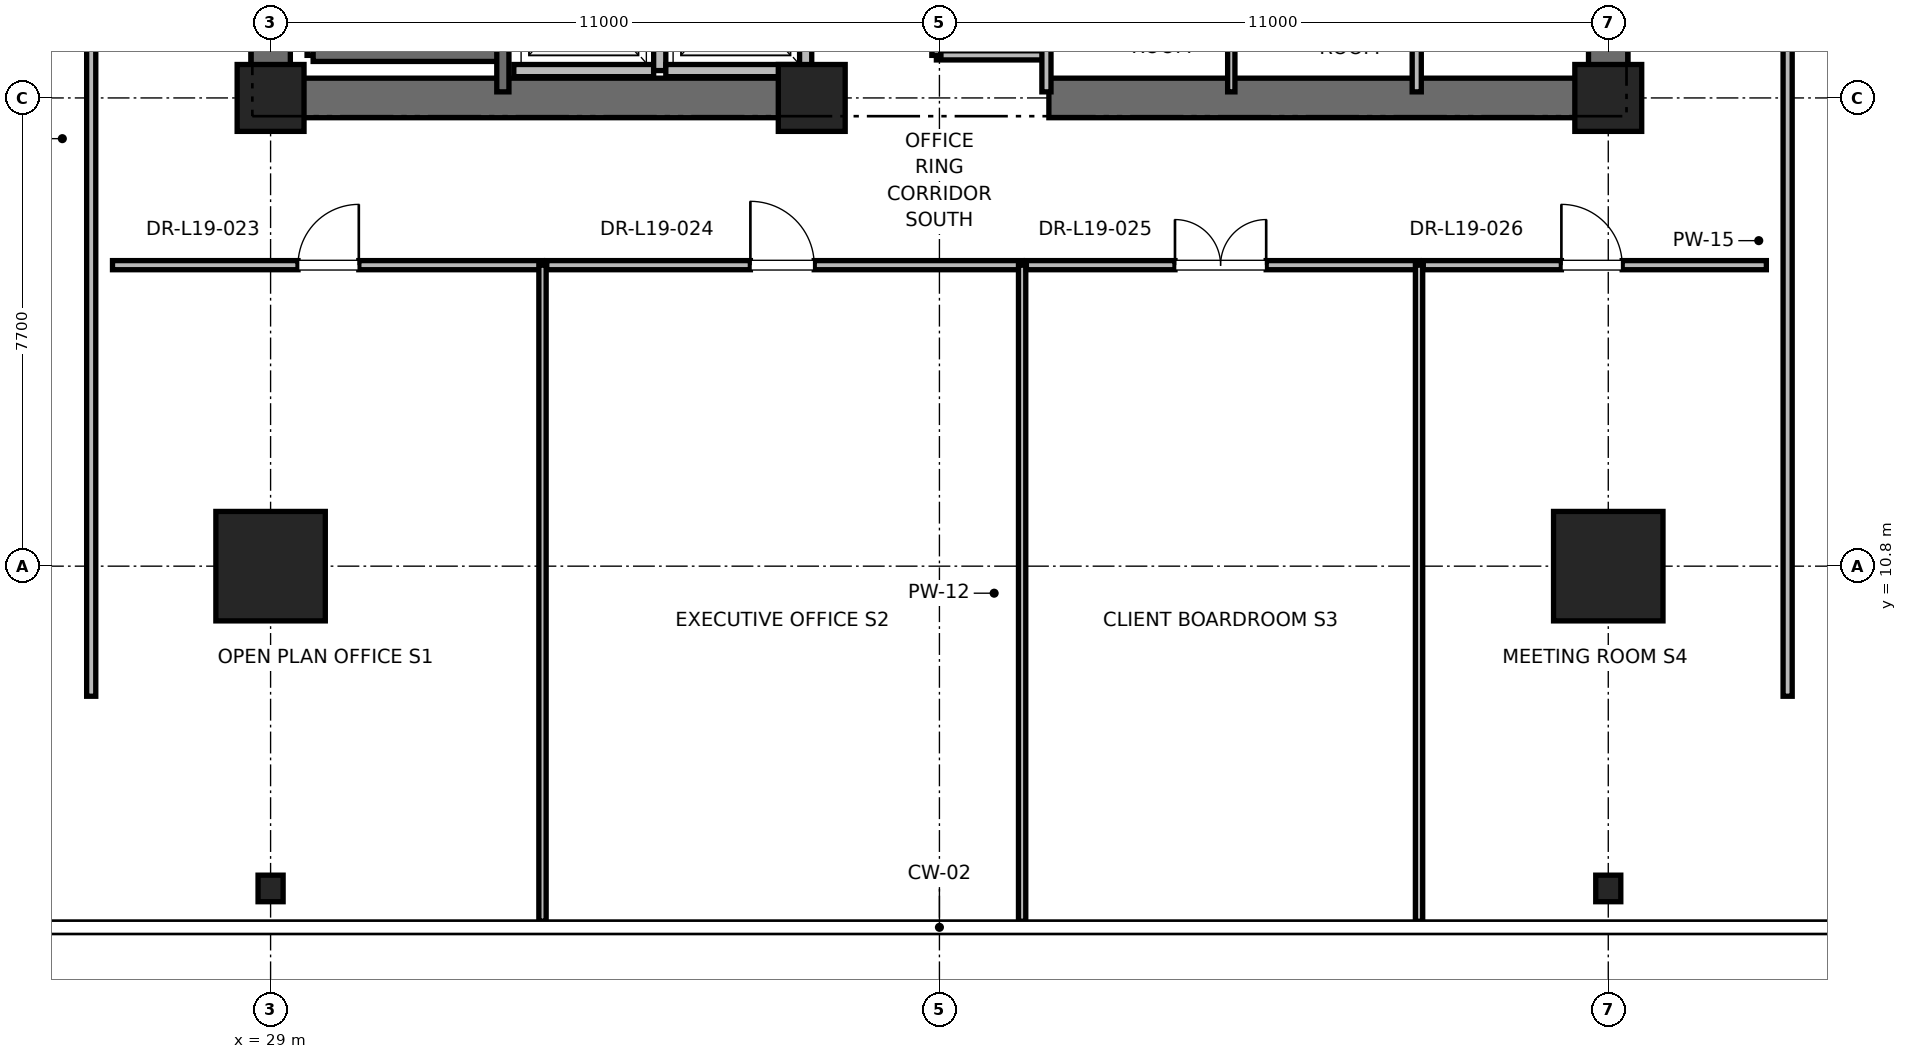
"""IFC4 building model, lengths in metres.
Left out: names, types, materials, properties, quantities, classifications, styles, units other than length and angle.
Written with IfcOpenShell. Run it as: python <this file> out.ifc"""

import sys

from ifc_helpers import new_model, si_unit, direction, frame, frame_2d, origin, origin_2d, place, context, subcontext, project, spatial, rectangle, i_section, extrude, element, fill, save


model = new_model("IFC4")
c1 = context("Model", 3, precision=1e-05, world=origin(), true_north=direction((0.0, 1.0)))
c2 = subcontext(c1, "Body", "Model", "MODEL_VIEW")
j1 = project(units=[si_unit("LENGTHUNIT", "METRE"), si_unit("PLANEANGLEUNIT", "RADIAN")], contexts=[c1])
p1 = place(None, origin())
s1 = spatial("IfcSite", under=j1, at=p1, CompositionType="ELEMENT")
p2 = place(p1, origin())
s2 = spatial("IfcBuilding", under=s1, at=p2, CompositionType="ELEMENT")
p3 = place(p2, frame((0.0, 0.0, 83.6)))
s3 = spatial("IfcBuildingStorey", under=s2, at=p3, CompositionType="ELEMENT", Elevation=83.6)
for number, where, z_axis, x_axis in (
    (1, (29.0, 10.8, 0.0), (0.0, 0.0, 1.0), (1.0, 0.0, 0.0)),
    (2, (51.0, 10.8, 0.0), (0.0, 0.0, 1.0), (1.0, 0.0, 0.0)),
):
    element("IfcColumn", number, at=place(p3, frame(where, z_axis=z_axis, x_axis=x_axis)), inside=s3, PredefinedType="COLUMN", context=c2, shape_type="SweptSolid", body=[
        extrude(rectangle(XDim=1.8, YDim=1.8, at=origin_2d()), origin(), (0.0, 0.0, 1.0), 4.0),
    ])
for number, where, z_axis, x_axis in (
    (3, (29.0, 5.5, 0.0), (0.0, 0.0, 1.0), (1.0, 0.0, 0.0)),
    (4, (51.0, 5.5, 0.0), (0.0, 0.0, 1.0), (1.0, 0.0, 0.0)),
):
    element("IfcColumn", number, at=place(p3, frame(where, z_axis=z_axis, x_axis=x_axis)), inside=s3, PredefinedType="COLUMN", context=c2, shape_type="SweptSolid", body=[
        extrude(i_section(OverallWidth=0.412, OverallDepth=0.437, WebThickness=0.036, FlangeThickness=0.058, FilletRadius=0.015, at=origin_2d()), origin(), (0.0, 0.0, 1.0), 4.0),
    ])
for number, where, z_axis, x_axis in (
    (5, (29.0, 18.5, 0.0), (0.0, 0.0, 1.0), (1.0, 0.0, 0.0)),
    (6, (51.0, 18.5, 0.0), (0.0, 0.0, 1.0), (1.0, 0.0, 0.0)),
    (7, (37.9, 18.5, 0.0), (0.0, 0.0, 1.0), (1.0, 0.0, 0.0)),
):
    element("IfcColumn", number, at=place(p3, frame(where, z_axis=z_axis, x_axis=x_axis)), inside=s3, PredefinedType="PILASTER", context=c2, shape_type="SweptSolid", body=[
        extrude(rectangle(XDim=1.1, YDim=1.1, at=origin_2d()), origin(), (0.0, 0.0, 1.0), 4.0),
    ])
for number, where, z_axis, x_axis in (
    (8, (29.0, 18.5, 0.0), (0.0, 0.0, 1.0), (1.0, 0.0, 0.0)),
    (9, (41.8, 18.5, 0.0), (0.0, 0.0, 1.0), (1.0, 0.0, 0.0)),
):
    element("IfcWall", number, at=place(p3, frame(where, z_axis=z_axis, x_axis=x_axis)), inside=s3, PredefinedType="SHEAR", context=c2, shape_type="SweptSolid", body=[
        extrude(rectangle(XDim=9.2, YDim=0.65, at=frame_2d((4.6, 0.0))), origin(), (0.0, 0.0, 1.0), 3.76),
    ])
p4 = place(p3, frame((29.0, 18.5, 0.0), z_axis=(0.0, 0.0, 1.0), x_axis=(0.0, 1.0, 0.0)))
e10 = element("IfcWall", 10, at=p4, inside=s3, PredefinedType="SHEAR", context=c2, shape_type="SweptSolid", body=[
    extrude(rectangle(XDim=8.8, YDim=0.65, at=frame_2d((4.4, 0.0))), origin(), (0.0, 0.0, 1.0), 3.76),
])
p5 = place(p3, frame((51.0, 18.5, 0.0), z_axis=(0.0, 0.0, 1.0), x_axis=(0.0, 1.0, 0.0)))
e11 = element("IfcWall", 11, at=p5, inside=s3, PredefinedType="SHEAR", context=c2, shape_type="SweptSolid", body=[
    extrude(rectangle(XDim=5.8, YDim=0.65, at=frame_2d((2.9, 0.0))), origin(), (0.0, 0.0, 1.0), 3.76),
])
p6 = place(p3, frame((29.7, 19.2, 0.0), z_axis=(0.0, 0.0, 1.0), x_axis=(0.0, 1.0, 0.0)))
e12 = element("IfcWall", 12, at=p6, inside=s3, PredefinedType="SOLIDWALL", context=c2, shape_type="SweptSolid", body=[
    extrude(rectangle(XDim=8.15, YDim=0.2, at=frame_2d((4.075, 0.0))), origin(), (0.0, 0.0, 1.0), 3.76),
])
p7 = place(p3, frame((29.7, 19.2, 0.0), z_axis=(0.0, 0.0, 1.0), x_axis=(1.0, 0.0, 0.0)))
e13 = element("IfcWall", 13, at=p7, inside=s3, PredefinedType="SOLIDWALL", context=c2, shape_type="SweptSolid", body=[
    extrude(rectangle(XDim=3.12, YDim=0.2, at=frame_2d((1.56, 0.0))), origin(), (0.0, 0.0, 1.0), 3.76),
])
p8 = place(p3, frame((32.82, 18.6, 0.0), z_axis=(0.0, 0.0, 1.0), x_axis=(0.0, 1.0, 0.0)))
e14 = element("IfcWall", 14, at=p8, inside=s3, PredefinedType="SOLIDWALL", context=c2, shape_type="SweptSolid", body=[
    extrude(rectangle(XDim=8.78, YDim=0.2, at=frame_2d((4.39, 0.0))), origin(), (0.0, 0.0, 1.0), 3.76),
])
p9 = place(p3, frame((33.0, 18.95, 0.0), z_axis=(0.0, 0.0, 1.0), x_axis=(1.0, 0.0, 0.0)))
e15 = element("IfcWall", 15, at=p9, inside=s3, PredefinedType="SOLIDWALL", context=c2, shape_type="SweptSolid", body=[
    extrude(rectangle(XDim=2.3, YDim=0.2, at=frame_2d((1.15, 0.0))), origin(), (0.0, 0.0, 1.0), 3.76),
])
p10 = place(p3, frame((35.4, 18.95, 0.0), z_axis=(0.0, 0.0, 1.0), x_axis=(0.0, 1.0, 0.0)))
e16 = element("IfcWall", 16, at=p10, inside=s3, PredefinedType="SOLIDWALL", context=c2, shape_type="SweptSolid", body=[
    extrude(rectangle(XDim=2.6, YDim=0.2, at=frame_2d((1.3, 0.0))), origin(), (0.0, 0.0, 1.0), 3.76),
])
p11 = place(p3, frame((35.5, 18.95, 0.0), z_axis=(0.0, 0.0, 1.0), x_axis=(1.0, 0.0, 0.0)))
e17 = element("IfcWall", 17, at=p11, inside=s3, PredefinedType="SOLIDWALL", context=c2, shape_type="SweptSolid", body=[
    extrude(rectangle(XDim=2.3, YDim=0.2, at=frame_2d((1.15, 0.0))), origin(), (0.0, 0.0, 1.0), 2.54),
])
p12 = place(p3, frame((37.8, 18.95, 0.0), z_axis=(0.0, 0.0, 1.0), x_axis=(0.0, 1.0, 0.0)))
e18 = element("IfcWall", 18, at=p12, inside=s3, PredefinedType="SOLIDWALL", context=c2, shape_type="SweptSolid", body=[
    extrude(rectangle(XDim=2.6, YDim=0.2, at=frame_2d((1.3, 0.0))), origin(), (0.0, 0.0, 1.0), 2.54),
])
p13 = place(p3, frame((39.95, 19.2, 0.0), z_axis=(0.0, 0.0, 1.0), x_axis=(1.0, 0.0, 0.0)))
e19 = element("IfcWall", 19, at=p13, inside=s3, PredefinedType="PARTITIONING", context=c2, shape_type="SweptSolid", body=[
    extrude(rectangle(XDim=1.81, YDim=0.15, at=frame_2d((0.905, 0.0))), origin(), (0.0, 0.0, 1.0), 2.85),
])
p14 = place(p3, frame((41.76, 18.6, 0.0), z_axis=(0.0, 0.0, 1.0), x_axis=(0.0, 1.0, 0.0)))
e20 = element("IfcWall", 20, at=p14, inside=s3, PredefinedType="PARTITIONING", context=c2, shape_type="SweptSolid", body=[
    extrude(rectangle(XDim=3.6, YDim=0.15, at=frame_2d((1.8, 0.0))), origin(), (0.0, 0.0, 1.0), 2.54),
])
p15 = place(p3, frame((39.95, 19.2, 0.0), z_axis=(0.0, 0.0, 1.0), x_axis=(0.0, 1.0, 0.0)))
e21 = element("IfcWall", 21, at=p15, inside=s3, PredefinedType="PARTITIONING", context=c2, shape_type="SweptSolid", body=[
    extrude(rectangle(XDim=3.0, YDim=0.15, at=frame_2d((1.5, 0.0))), origin(), (0.0, 0.0, 1.0), 2.85),
])
p16 = place(p15, frame((1.05, 0.0, 0.0)))
e22 = element("IfcOpeningElement", 22, at=p16, cuts=e21, PredefinedType="OPENING", context=c2, shape_type="SweptSolid", body=[
    extrude(rectangle(XDim=0.9, YDim=2.1, at=frame_2d((0.45, 1.05))), frame((0.0, 0.075, 0.0), z_axis=(0.0, -1.0, 0.0), x_axis=(1.0, 0.0, 0.0)), (0.0, 0.0, 1.0), 0.15),
])
p17 = place(p3, frame((47.85, 18.6, 0.0), z_axis=(0.0, 0.0, 1.0), x_axis=(0.0, 1.0, 0.0)))
e23 = element("IfcWall", 23, at=p17, inside=s3, PredefinedType="PARTITIONING", context=c2, shape_type="SweptSolid", body=[
    extrude(rectangle(XDim=2.54, YDim=0.15, at=frame_2d((1.27, 0.0))), origin(), (0.0, 0.0, 1.0), 2.85),
])
p18 = place(p3, frame((44.8, 18.6, 0.0), z_axis=(0.0, 0.0, 1.0), x_axis=(0.0, 1.0, 0.0)))
e24 = element("IfcWall", 24, at=p18, inside=s3, PredefinedType="PARTITIONING", context=c2, shape_type="SweptSolid", body=[
    extrude(rectangle(XDim=3.02, YDim=0.12, at=frame_2d((1.51, 0.0))), origin(), (0.0, 0.0, 1.0), 2.85),
])
p19 = place(p3, frame((26.4, 15.75, 0.0), z_axis=(0.0, 0.0, 1.0), x_axis=(1.0, 0.0, 0.0)))
e25 = element("IfcWall", 25, at=p19, inside=s3, PredefinedType="PARTITIONING", context=c2, shape_type="SweptSolid", body=[
    extrude(rectangle(XDim=7.072, YDim=0.15, at=frame_2d((3.536, 0.0))), origin(), (0.0, 0.0, 1.0), 2.85),
])
p20 = place(p19, frame((3.051, 0.0, 0.0)))
e26 = element("IfcOpeningElement", 26, at=p20, cuts=e25, PredefinedType="OPENING", context=c2, shape_type="SweptSolid", body=[
    extrude(rectangle(XDim=1.0, YDim=2.15, at=frame_2d((0.5, 1.075))), frame((0.0, 0.075, 0.0), z_axis=(0.0, -1.0, 0.0), x_axis=(1.0, 0.0, 0.0)), (0.0, 0.0, 1.0), 0.15),
])
p21 = place(p3, frame((33.472, 4.961, 0.0), z_axis=(0.0, 0.0, 1.0), x_axis=(0.0, 1.0, 0.0)))
e27 = element("IfcWall", 27, at=p21, inside=s3, PredefinedType="PARTITIONING", context=c2, shape_type="SweptSolid", body=[
    extrude(rectangle(XDim=10.789, YDim=0.12, at=frame_2d((5.395, 0.0))), origin(), (0.0, 0.0, 1.0), 2.39),
])
p22 = place(p3, frame((33.542, 15.75, 0.0), z_axis=(0.0, 0.0, 1.0), x_axis=(1.0, 0.0, 0.0)))
e28 = element("IfcWall", 28, at=p22, inside=s3, PredefinedType="PARTITIONING", context=c2, shape_type="SweptSolid", body=[
    extrude(rectangle(XDim=7.818, YDim=0.15, at=frame_2d((3.909, 0.0))), origin(), (0.0, 0.0, 1.0), 2.85),
])
p23 = place(p22, frame((3.349, 0.0, 0.0)))
e29 = element("IfcOpeningElement", 29, at=p23, cuts=e28, PredefinedType="OPENING", context=c2, shape_type="SweptSolid", body=[
    extrude(rectangle(XDim=1.05, YDim=2.2, at=frame_2d((0.525, 1.1))), frame((0.0, 0.075, 0.0), z_axis=(0.0, -1.0, 0.0), x_axis=(1.0, 0.0, 0.0)), (0.0, 0.0, 1.0), 0.15),
])
p24 = place(p3, frame((41.36, 4.961, 0.0), z_axis=(0.0, 0.0, 1.0), x_axis=(0.0, 1.0, 0.0)))
e30 = element("IfcWall", 30, at=p24, inside=s3, PredefinedType="PARTITIONING", context=c2, shape_type="SweptSolid", body=[
    extrude(rectangle(XDim=10.789, YDim=0.12, at=frame_2d((5.395, 0.0))), origin(), (0.0, 0.0, 1.0), 2.39),
])
p25 = place(p3, frame((41.43, 15.75, 0.0), z_axis=(0.0, 0.0, 1.0), x_axis=(1.0, 0.0, 0.0)))
e31 = element("IfcWall", 31, at=p25, inside=s3, PredefinedType="PARTITIONING", context=c2, shape_type="SweptSolid", body=[
    extrude(rectangle(XDim=6.458, YDim=0.15, at=frame_2d((3.229, 0.0))), origin(), (0.0, 0.0, 1.0), 2.85),
])
p26 = place(p25, frame((2.444, 0.0, 0.0)))
e32 = element("IfcOpeningElement", 32, at=p26, cuts=e31, PredefinedType="OPENING", context=c2, shape_type="SweptSolid", body=[
    extrude(rectangle(XDim=1.5, YDim=2.25, at=frame_2d((0.75, 1.125))), frame((0.0, 0.075, 0.0), z_axis=(0.0, -1.0, 0.0), x_axis=(1.0, 0.0, 0.0)), (0.0, 0.0, 1.0), 0.15),
])
p27 = place(p3, frame((47.888, 4.961, 0.0), z_axis=(0.0, 0.0, 1.0), x_axis=(0.0, 1.0, 0.0)))
e33 = element("IfcWall", 33, at=p27, inside=s3, PredefinedType="PARTITIONING", context=c2, shape_type="SweptSolid", body=[
    extrude(rectangle(XDim=10.789, YDim=0.12, at=frame_2d((5.395, 0.0))), origin(), (0.0, 0.0, 1.0), 2.39),
])
p28 = place(p3, frame((47.958, 15.75, 0.0), z_axis=(0.0, 0.0, 1.0), x_axis=(1.0, 0.0, 0.0)))
e34 = element("IfcWall", 34, at=p28, inside=s3, PredefinedType="PARTITIONING", context=c2, shape_type="SweptSolid", body=[
    extrude(rectangle(XDim=5.642, YDim=0.15, at=frame_2d((2.821, 0.0))), origin(), (0.0, 0.0, 1.0), 2.85),
])
p29 = place(p28, frame((2.271, 0.0, 0.0)))
e35 = element("IfcOpeningElement", 35, at=p29, cuts=e34, PredefinedType="OPENING", context=c2, shape_type="SweptSolid", body=[
    extrude(rectangle(XDim=1.0, YDim=2.15, at=frame_2d((0.5, 1.075))), frame((0.0, 0.075, 0.0), z_axis=(0.0, -1.0, 0.0), x_axis=(1.0, 0.0, 0.0)), (0.0, 0.0, 1.0), 0.15),
])
p30 = place(p3, frame((26.05, 8.661, 0.0), z_axis=(0.0, 0.0, 1.0), x_axis=(0.0, 1.0, 0.0)))
e36 = element("IfcWall", 36, at=p30, inside=s3, PredefinedType="PARTITIONING", context=c2, shape_type="SweptSolid", body=[
    extrude(rectangle(XDim=37.678, YDim=0.15, at=frame_2d((18.839, 0.0))), origin(), (0.0, 0.0, 1.0), 2.85),
])
p31 = place(p30, frame((18.339, 0.0, 0.0)))
e37 = element("IfcOpeningElement", 37, at=p31, cuts=e36, PredefinedType="OPENING", context=c2, shape_type="SweptSolid", body=[
    extrude(rectangle(XDim=1.0, YDim=2.15, at=frame_2d((0.5, 1.075))), frame((0.0, 0.075, 0.0), z_axis=(0.0, -1.0, 0.0), x_axis=(1.0, 0.0, 0.0)), (0.0, 0.0, 1.0), 0.15),
])
p32 = place(p3, frame((53.95, 8.661, 0.0), z_axis=(0.0, 0.0, 1.0), x_axis=(0.0, 1.0, 0.0)))
e38 = element("IfcWall", 38, at=p32, inside=s3, PredefinedType="PARTITIONING", context=c2, shape_type="SweptSolid", body=[
    extrude(rectangle(XDim=21.1, YDim=0.15, at=frame_2d((10.55, 0.0))), origin(), (0.0, 0.0, 1.0), 2.85),
])
p33 = place(p32, frame((14.985, 0.0, 0.0)))
e39 = element("IfcOpeningElement", 39, at=p33, cuts=e38, PredefinedType="OPENING", context=c2, shape_type="SweptSolid", body=[
    extrude(rectangle(XDim=1.0, YDim=2.15, at=frame_2d((0.5, 1.075))), frame((0.0, 0.075, 0.0), z_axis=(0.0, -1.0, 0.0), x_axis=(1.0, 0.0, 0.0)), (0.0, 0.0, 1.0), 0.15),
])
p34 = place(p20, origin())
e40 = element("IfcDoor", 40, at=p34, inside=s3, OperationType="SINGLE_SWING_RIGHT", PredefinedType="DOOR", context=c2, shape_type="SweptSolid", body=[
    extrude(rectangle(XDim=1.0, YDim=2.15, at=frame_2d((0.5, 1.075))), frame((0.0, 0.025, 0.0), z_axis=(0.0, -1.0, 0.0), x_axis=(1.0, 0.0, 0.0)), (0.0, 0.0, 1.0), 0.05),
])
fill(e26, e40)
p35 = place(p23, origin())
e41 = element("IfcDoor", 41, at=p35, inside=s3, OperationType="SINGLE_SWING_LEFT", PredefinedType="DOOR", context=c2, shape_type="SweptSolid", body=[
    extrude(rectangle(XDim=1.05, YDim=2.2, at=frame_2d((0.525, 1.1))), frame((0.0, 0.025, 0.0), z_axis=(0.0, -1.0, 0.0), x_axis=(1.0, 0.0, 0.0)), (0.0, 0.0, 1.0), 0.05),
])
fill(e29, e41)
p36 = place(p26, origin())
e42 = element("IfcDoor", 42, at=p36, inside=s3, OperationType="DOUBLE_DOOR_SINGLE_SWING", PredefinedType="DOOR", context=c2, shape_type="SweptSolid", body=[
    extrude(rectangle(XDim=1.5, YDim=2.25, at=frame_2d((0.75, 1.125))), frame((0.0, 0.025, 0.0), z_axis=(0.0, -1.0, 0.0), x_axis=(1.0, 0.0, 0.0)), (0.0, 0.0, 1.0), 0.05),
])
fill(e32, e42)
p37 = place(p29, origin())
e43 = element("IfcDoor", 43, at=p37, inside=s3, OperationType="SINGLE_SWING_LEFT", PredefinedType="DOOR", context=c2, shape_type="SweptSolid", body=[
    extrude(rectangle(XDim=1.0, YDim=2.15, at=frame_2d((0.5, 1.075))), frame((0.0, 0.025, 0.0), z_axis=(0.0, -1.0, 0.0), x_axis=(1.0, 0.0, 0.0)), (0.0, 0.0, 1.0), 0.05),
])
fill(e35, e43)
save(model, sys.argv[1])
